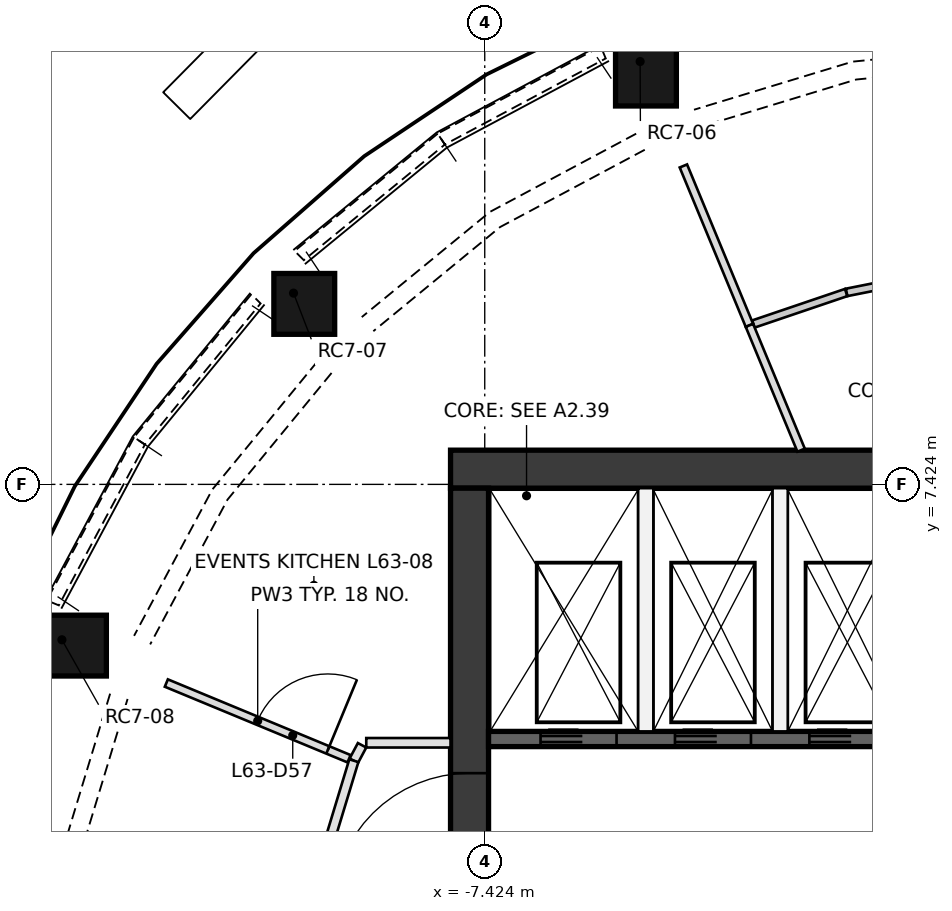
"""IFC4 building model, lengths in metres.
Left out: names, types, materials, properties, quantities, classifications, styles, units other than length and angle.
Written with IfcOpenShell. Run it as: python <this file> out.ifc"""

import sys

from ifc_helpers import new_model, si_unit, direction, frame, frame_2d, origin, origin_2d, place, context, subcontext, project, spatial, polyline, rectangle, outline, extrude, element, fill, save


model = new_model("IFC4")
c1 = context("Model", 3, precision=1e-05, world=origin(), true_north=direction((0.0, 1.0)))
c2 = subcontext(c1, "Body", "Model", "MODEL_VIEW")
j1 = project(units=[si_unit("LENGTHUNIT", "METRE"), si_unit("PLANEANGLEUNIT", "RADIAN")], contexts=[c1])
p1 = place(None, origin())
s1 = spatial("IfcSite", under=j1, at=p1, CompositionType="ELEMENT")
p2 = place(p1, origin())
s2 = spatial("IfcBuilding", under=s1, at=p2, CompositionType="ELEMENT")
p3 = place(p2, frame((0.0, 0.0, 231.2)))
s3 = spatial("IfcBuildingStorey", under=s2, at=p3, CompositionType="ELEMENT", Elevation=231.2)
p4 = place(p3, frame((-5.379, 12.987, 0.5), z_axis=(0.0, 0.0, 1.0), x_axis=(0.923896423382, 0.382642651649, 0.0)))
e1 = element("IfcColumn", 1, at=p4, inside=s3, PredefinedType="COLUMN", context=c2, shape_type="SweptSolid", body=[
    extrude(rectangle(XDim=0.8, YDim=0.8, at=origin_2d()), origin(), (0.0, -0.275, 0.962), 3.328),
])
p5 = place(p3, frame((-9.94, 9.94, 0.5), z_axis=(0.0, 0.0, 1.0), x_axis=(0.707106781187, 0.707106781187, 0.0)))
e2 = element("IfcColumn", 2, at=p5, inside=s3, PredefinedType="COLUMN", context=c2, shape_type="SweptSolid", body=[
    extrude(rectangle(XDim=0.8, YDim=0.8, at=origin_2d()), origin(), (0.0, -0.275, 0.962), 3.328),
])
p6 = place(p3, frame((-12.987, 5.379, 0.5), z_axis=(0.0, 0.0, 1.0), x_axis=(0.382642651649, 0.923896423382, 0.0)))
e3 = element("IfcColumn", 3, at=p6, inside=s3, PredefinedType="COLUMN", context=c2, shape_type="SweptSolid", body=[
    extrude(rectangle(XDim=0.8, YDim=0.8, at=origin_2d()), origin(), (0.0, -0.275, 0.962), 3.328),
])
p7 = place(p3, frame((-7.874, 7.624, 0.0), z_axis=(0.0, 0.0, 1.0), x_axis=(1.0, 0.0, 0.0)))
e4 = element("IfcWall", 4, at=p7, inside=s3, PredefinedType="SHEAR", context=c2, shape_type="SweptSolid", body=[
    extrude(rectangle(XDim=15.748, YDim=0.5, at=frame_2d((7.874, 0.0))), origin(), (0.0, 0.0, 1.0), 3.3),
])
p8 = place(p3, frame((-7.624, -7.374, 0.0), z_axis=(0.0, 0.0, 1.0), x_axis=(0.0, 1.0, 0.0)))
e5 = element("IfcWall", 5, at=p8, inside=s3, PredefinedType="SHEAR", context=c2, shape_type="SweptSolid", body=[
    extrude(rectangle(XDim=14.748, YDim=0.5, at=frame_2d((7.374, 0.0))), origin(), (0.0, 0.0, 1.0), 3.3),
])
p9 = place(p8, frame((6.874, 0.0, 0.0)))
e6 = element("IfcOpeningElement", 6, at=p9, cuts=e5, PredefinedType="OPENING", context=c2, shape_type="SweptSolid", body=[
    extrude(rectangle(XDim=1.0, YDim=2.1, at=frame_2d((0.5, 1.05))), frame((0.0, 0.26, 0.0), z_axis=(0.0, -1.0, 0.0), x_axis=(1.0, 0.0, 0.0)), (0.0, 0.0, 1.0), 0.52),
])
p10 = place(p8, frame((3.75, 0.0, 0.0)))
e7 = element("IfcOpeningElement", 7, at=p10, cuts=e5, PredefinedType="OPENING", context=c2, shape_type="SweptSolid", body=[
    extrude(rectangle(XDim=1.8, YDim=2.1, at=frame_2d((0.9, 1.05))), frame((0.0, 0.26, 0.0), z_axis=(0.0, -1.0, 0.0), x_axis=(1.0, 0.0, 0.0)), (0.0, 0.0, 1.0), 0.52),
])
p11 = place(p8, frame((9.198, 0.0, 0.0)))
e8 = element("IfcOpeningElement", 8, at=p11, cuts=e5, PredefinedType="OPENING", context=c2, shape_type="SweptSolid", body=[
    extrude(rectangle(XDim=1.8, YDim=2.1, at=frame_2d((0.9, 1.05))), frame((0.0, 0.26, 0.0), z_axis=(0.0, -1.0, 0.0), x_axis=(1.0, 0.0, 0.0)), (0.0, 0.0, 1.0), 0.52),
])
p12 = place(p3, frame((-7.374, 4.074, 0.0), z_axis=(0.0, 0.0, 1.0), x_axis=(1.0, 0.0, 0.0)))
e9 = element("IfcWall", 9, at=p12, inside=s3, PredefinedType="SHEAR", context=c2, shape_type="SweptSolid", body=[
    extrude(rectangle(XDim=7.374, YDim=0.2, at=frame_2d((3.687, 0.0))), origin(), (0.0, 0.0, 1.0), 3.3),
])
p13 = place(p12, frame((0.684, 0.0, 0.0)))
e10 = element("IfcOpeningElement", 10, at=p13, cuts=e9, PredefinedType="OPENING", context=c2, shape_type="SweptSolid", body=[
    extrude(rectangle(XDim=1.0, YDim=2.1, at=frame_2d((0.5, 1.05))), frame((0.0, 0.11, 0.0), z_axis=(0.0, -1.0, 0.0), x_axis=(1.0, 0.0, 0.0)), (0.0, 0.0, 1.0), 0.22),
])
p14 = place(p12, frame((2.453, 0.0, 0.0)))
e11 = element("IfcOpeningElement", 11, at=p14, cuts=e9, PredefinedType="OPENING", context=c2, shape_type="SweptSolid", body=[
    extrude(rectangle(XDim=1.0, YDim=2.1, at=frame_2d((0.5, 1.05))), frame((0.0, 0.11, 0.0), z_axis=(0.0, -1.0, 0.0), x_axis=(1.0, 0.0, 0.0)), (0.0, 0.0, 1.0), 0.22),
])
p15 = place(p12, frame((4.221, 0.0, 0.0)))
e12 = element("IfcOpeningElement", 12, at=p15, cuts=e9, PredefinedType="OPENING", context=c2, shape_type="SweptSolid", body=[
    extrude(rectangle(XDim=1.0, YDim=2.1, at=frame_2d((0.5, 1.05))), frame((0.0, 0.11, 0.0), z_axis=(0.0, -1.0, 0.0), x_axis=(1.0, 0.0, 0.0)), (0.0, 0.0, 1.0), 0.22),
])
p16 = place(p12, frame((5.99, 0.0, 0.0)))
e13 = element("IfcOpeningElement", 13, at=p16, cuts=e9, PredefinedType="OPENING", context=c2, shape_type="SweptSolid", body=[
    extrude(rectangle(XDim=1.0, YDim=2.1, at=frame_2d((0.5, 1.05))), frame((0.0, 0.11, 0.0), z_axis=(0.0, -1.0, 0.0), x_axis=(1.0, 0.0, 0.0)), (0.0, 0.0, 1.0), 0.22),
])
for number, where, z_axis, x_axis in (
    (14, (-5.305, 4.174, 0.0), (0.0, 0.0, 1.0), (0.0, 1.0, 0.0)),
    (15, (-3.537, 4.174, 0.0), (0.0, 0.0, 1.0), (0.0, 1.0, 0.0)),
):
    element("IfcWall", number, at=place(p3, frame(where, z_axis=z_axis, x_axis=x_axis)), inside=s3, PredefinedType="PARTITIONING", context=c2, shape_type="SweptSolid", body=[
        extrude(rectangle(XDim=3.2, YDim=0.2, at=frame_2d((1.6, 0.0))), origin(), (0.0, 0.0, 1.0), 3.3),
    ])
p17 = place(p3, frame((-2.824, 14.2, 0.0), z_axis=(-0.271074750296, 0.894721380135, 0.354953703573), x_axis=(-0.957038883806, -0.289959608839, 1.1226683e-05)))
e16 = element("IfcWall", 16, at=p17, inside=s3, PredefinedType="SOLIDWALL", context=c2, shape_type="SweptSolid", body=[
    extrude(outline(polyline([(0.0, 0.0), (2.434, -5.551e-17), (2.417, 0.481), (0.017, 0.481), (0.0, 0.0)])), origin(), (0.0, 0.0, -1.0), 0.3),
])
p18 = place(p3, frame((-5.898, 13.186, 0.0), z_axis=(-0.441016524886, 0.824332600798, 0.35493687895), x_axis=(-0.881740708382, -0.471734377661, 1.0715603e-05)))
e17 = element("IfcWall", 17, at=p18, inside=s3, PredefinedType="SOLIDWALL", context=c2, shape_type="SweptSolid", body=[
    extrude(outline(polyline([(0.0, 0.0), (2.434, 0.0), (2.417, 0.481), (0.017, 0.481), (0.0, 0.0)])), origin(), (0.0, 0.0, -1.0), 0.3),
])
p19 = place(p3, frame((-8.044, 12.038, 0.0), z_axis=(-0.59284076781, 0.722862546463, 0.354978257002), x_axis=(-0.773221096766, -0.634136527431, -9.701072e-06)))
e18 = element("IfcWall", 18, at=p19, inside=s3, PredefinedType="SOLIDWALL", context=c2, shape_type="SweptSolid", body=[
    extrude(outline(polyline([(0.0, 0.0), (2.434, 5.551e-17), (2.417, 0.481), (0.017, 0.481), (0.0, 0.0)])), origin(), (0.0, 0.0, -1.0), 0.3),
])
p20 = place(p3, frame((-10.495, 9.926, 0.0), z_axis=(-0.722862546463, 0.59284076781, 0.354978257002), x_axis=(-0.634136527431, -0.773221096766, 9.701072e-06)))
e19 = element("IfcWall", 19, at=p20, inside=s3, PredefinedType="SOLIDWALL", context=c2, shape_type="SweptSolid", body=[
    extrude(outline(polyline([(0.0, 0.0), (2.434, -5.551e-17), (2.417, 0.481), (0.017, 0.481), (0.0, 0.0)])), origin(), (0.0, 0.0, -1.0), 0.3),
])
p21 = place(p3, frame((-12.038, 8.044, 0.0), z_axis=(-0.824402860411, 0.441126603603, 0.354636776631), x_axis=(-0.471787066311, -0.881712517728, 1.195964e-05)))
e20 = element("IfcWall", 20, at=p21, inside=s3, PredefinedType="SOLIDWALL", context=c2, shape_type="SweptSolid", body=[
    extrude(outline(polyline([(0.0, 0.0), (2.434, 5.551e-17), (2.417, 0.481), (0.017, 0.481), (0.0, 0.0)])), origin(), (0.0, 0.0, -1.0), 0.3),
])
p22 = place(p3, frame((-13.494, 5.154, 0.0), z_axis=(-0.894631168658, 0.271094631402, 0.355165838574), x_axis=(-0.290000037325, -0.957026634075, 4.815507e-06)))
e21 = element("IfcWall", 21, at=p22, inside=s3, PredefinedType="SOLIDWALL", context=c2, shape_type="SweptSolid", body=[
    extrude(outline(polyline([(0.0, 0.0), (2.434, 0.0), (2.417, 0.481), (0.017, 0.481), (0.0, 0.0)])), origin(), (0.0, 0.0, -1.0), 0.3),
])
p23 = place(p3, frame((-9.146, 3.789, 0.0), z_axis=(0.0, 0.0, 1.0), x_axis=(0.471249165364, 0.882000127066, 0.0)))
e22 = element("IfcWall", 22, at=p23, inside=s3, PredefinedType="PARTITIONING", context=c2, shape_type="SweptSolid", body=[
    extrude(rectangle(XDim=0.23, YDim=0.125, at=frame_2d((0.115, 0.0))), origin(), (0.0, 0.0, 1.0), 3.3),
])
p24 = place(p3, frame((-8.983, 4.024, 0.0), z_axis=(0.0, 0.0, 1.0), x_axis=(1.0, 0.0, 0.0)))
e23 = element("IfcWall", 23, at=p24, inside=s3, PredefinedType="PARTITIONING", context=c2, shape_type="SweptSolid", body=[
    extrude(rectangle(XDim=1.109, YDim=0.125, at=frame_2d((0.554, 0.0))), origin(), (0.0, 0.0, 1.0), 3.3),
])
p25 = place(p3, frame((-9.708, 1.937, 0.0), z_axis=(0.0, 0.0, 1.0), x_axis=(0.29025256199, 0.956950077203, 0.0)))
e24 = element("IfcWall", 24, at=p25, inside=s3, PredefinedType="PARTITIONING", context=c2, shape_type="SweptSolid", body=[
    extrude(rectangle(XDim=1.935, YDim=0.125, at=frame_2d((0.967, 0.0))), origin(), (0.0, 0.0, 1.0), 3.3),
])
p26 = place(p3, frame((-2.669, 9.948, 0.0), z_axis=(0.0, 0.0, 1.0), x_axis=(-0.946925137773, -0.321454170069, 0.0)))
e25 = element("IfcWall", 25, at=p26, inside=s3, PredefinedType="PARTITIONING", context=c2, shape_type="SweptSolid", body=[
    extrude(rectangle(XDim=1.288, YDim=0.1, at=frame_2d((0.644, 0.0))), origin(), (0.0, 0.0, 1.0), 3.3),
])
p27 = place(p3, frame((-1.348, 10.211, 0.0), z_axis=(0.0, 0.0, 1.0), x_axis=(-0.980797195444, -0.195030411497, 0.0)))
e26 = element("IfcWall", 26, at=p27, inside=s3, PredefinedType="PARTITIONING", context=c2, shape_type="SweptSolid", body=[
    extrude(rectangle(XDim=1.341, YDim=0.1, at=frame_2d((0.67, 0.0))), origin(), (0.0, 0.0, 1.0), 3.3),
])
p28 = place(p3, frame((-3.942, 9.516, 0.0), z_axis=(0.0, 0.0, 1.0), x_axis=(-0.382674756939, 0.923883125943, 0.0)))
e27 = element("IfcWall", 27, at=p28, inside=s3, PredefinedType="PARTITIONING", context=c2, shape_type="SweptSolid", body=[
    extrude(rectangle(XDim=2.27, YDim=0.105, at=frame_2d((1.135, 0.0))), origin(), (0.0, 0.0, 1.0), 3.3),
])
p29 = place(p3, frame((-3.261, 7.874, 0.0), z_axis=(0.0, 0.0, 1.0), x_axis=(-0.382683383062, 0.923879552933, 0.0)))
e28 = element("IfcWall", 28, at=p29, inside=s3, PredefinedType="PARTITIONING", context=c2, shape_type="SweptSolid", body=[
    extrude(rectangle(XDim=1.777, YDim=0.105, at=frame_2d((0.889, 0.0))), origin(), (0.0, 0.0, 1.0), 3.3),
])
p30 = place(p3, frame((-11.613, 4.81, 0.0), z_axis=(0.0, 0.0, 1.0), x_axis=(0.923904773076, -0.382622490566, 0.0)))
e29 = element("IfcWall", 29, at=p30, inside=s3, PredefinedType="PARTITIONING", context=c2, shape_type="SweptSolid", body=[
    extrude(rectangle(XDim=2.602, YDim=0.105, at=frame_2d((1.301, 0.0))), origin(), (0.0, 0.0, 1.0), 3.3),
])
p31 = place(p30, frame((1.3, 0.0, 0.0)))
e30 = element("IfcOpeningElement", 30, at=p31, cuts=e29, PredefinedType="OPENING", context=c2, shape_type="SweptSolid", body=[
    extrude(rectangle(XDim=1.0, YDim=2.1, at=frame_2d((0.5, 1.05))), frame((0.0, 0.062, 0.0), z_axis=(0.0, -1.0, 0.0), x_axis=(1.0, 0.0, 0.0)), (0.0, 0.0, 1.0), 0.125),
])
p32 = place(p13, frame((1.0, 0.0, 0.0), z_axis=(0.0, 0.0, 1.0), x_axis=(-1.0, 0.0, 0.0)))
e31 = element("IfcDoor", 31, at=p32, inside=s3, OperationType="DOUBLE_DOOR_SLIDING", PredefinedType="DOOR", context=c2, shape_type="SweptSolid", body=[
    extrude(rectangle(XDim=1.0, YDim=2.1, at=frame_2d((0.5, 1.05))), frame((0.0, 0.025, 0.0), z_axis=(0.0, -1.0, 0.0), x_axis=(1.0, 0.0, 0.0)), (0.0, 0.0, 1.0), 0.05),
])
fill(e10, e31)
p33 = place(p14, frame((1.0, 0.0, 0.0), z_axis=(0.0, 0.0, 1.0), x_axis=(-1.0, 0.0, 0.0)))
e32 = element("IfcDoor", 32, at=p33, inside=s3, OperationType="DOUBLE_DOOR_SLIDING", PredefinedType="DOOR", context=c2, shape_type="SweptSolid", body=[
    extrude(rectangle(XDim=1.0, YDim=2.1, at=frame_2d((0.5, 1.05))), frame((0.0, 0.025, 0.0), z_axis=(0.0, -1.0, 0.0), x_axis=(1.0, 0.0, 0.0)), (0.0, 0.0, 1.0), 0.05),
])
fill(e11, e32)
p34 = place(p15, frame((1.0, 0.0, 0.0), z_axis=(0.0, 0.0, 1.0), x_axis=(-1.0, 0.0, 0.0)))
e33 = element("IfcDoor", 33, at=p34, inside=s3, OperationType="DOUBLE_DOOR_SLIDING", PredefinedType="DOOR", context=c2, shape_type="SweptSolid", body=[
    extrude(rectangle(XDim=1.0, YDim=2.1, at=frame_2d((0.5, 1.05))), frame((0.0, 0.025, 0.0), z_axis=(0.0, -1.0, 0.0), x_axis=(1.0, 0.0, 0.0)), (0.0, 0.0, 1.0), 0.05),
])
fill(e12, e33)
p35 = place(p11, origin())
e34 = element("IfcDoor", 34, at=p35, inside=s3, OperationType="DOUBLE_DOOR_SINGLE_SWING", PredefinedType="DOOR", context=c2, shape_type="SweptSolid", body=[
    extrude(rectangle(XDim=1.8, YDim=2.1, at=frame_2d((0.9, 1.05))), frame((0.0, 0.025, 0.0), z_axis=(0.0, -1.0, 0.0), x_axis=(1.0, 0.0, 0.0)), (0.0, 0.0, 1.0), 0.05),
])
fill(e8, e34)
p36 = place(p31, origin())
e35 = element("IfcDoor", 35, at=p36, inside=s3, OperationType="SINGLE_SWING_RIGHT", PredefinedType="DOOR", context=c2, shape_type="SweptSolid", body=[
    extrude(rectangle(XDim=1.0, YDim=2.1, at=frame_2d((0.5, 1.05))), frame((0.0, 0.025, 0.0), z_axis=(0.0, -1.0, 0.0), x_axis=(1.0, 0.0, 0.0)), (0.0, 0.0, 1.0), 0.05),
])
fill(e30, e35)
save(model, sys.argv[1])
